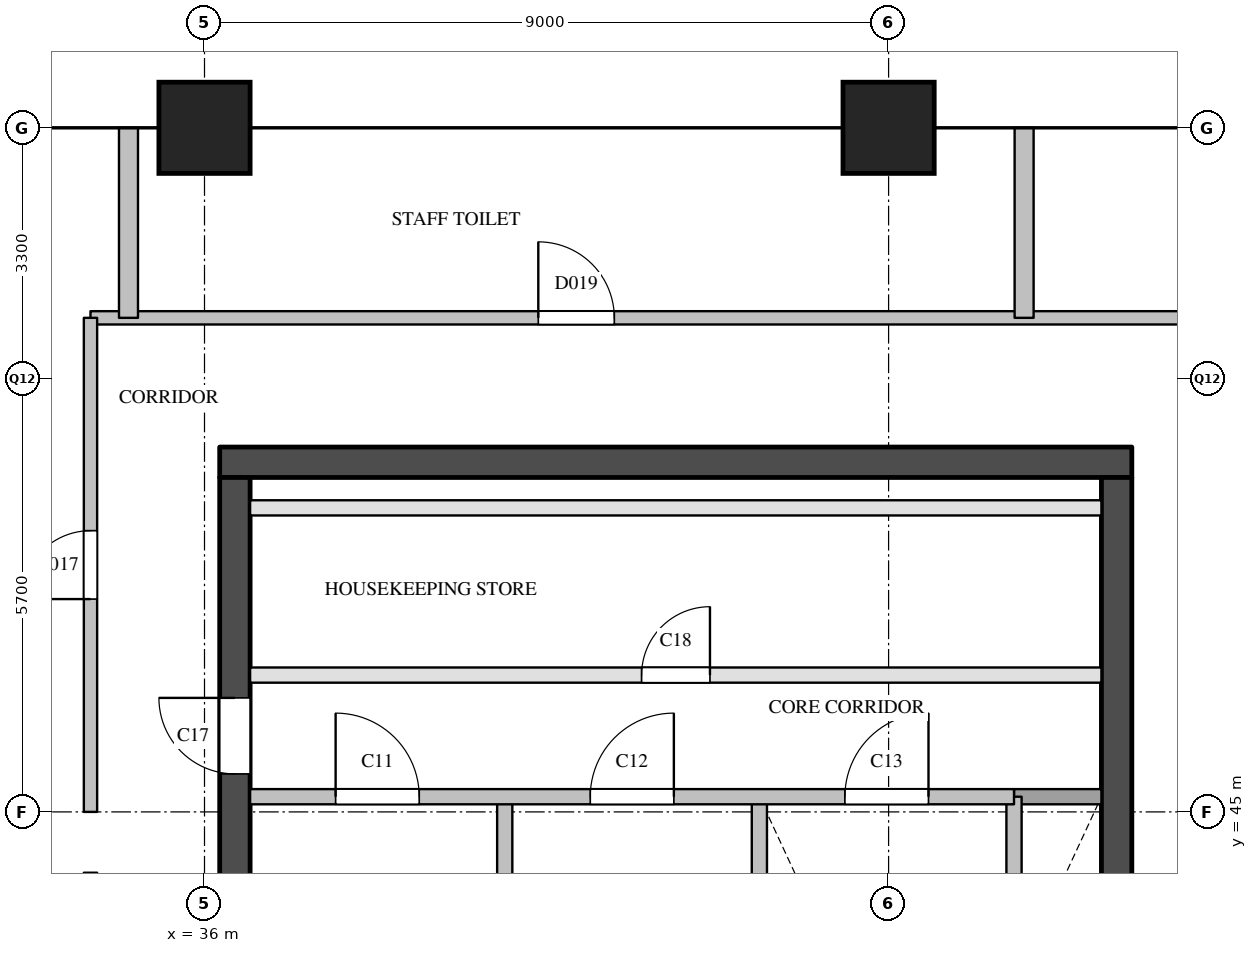
"""IFC4 building model, lengths in metres.
Left out: names, types, materials, properties, quantities, classifications, styles, units other than length and angle.
Written with IfcOpenShell. Run it as: python <this file> out.ifc"""

import sys

from ifc_helpers import new_model, si_unit, direction, frame, frame_2d, origin, origin_2d, place, context, subcontext, project, spatial, rectangle, extrude, element, fill, save


model = new_model("IFC4")
c1 = context("Model", 3, precision=1e-05, world=origin(), true_north=direction((0.0, 1.0)))
c2 = subcontext(c1, "Body", "Model", "MODEL_VIEW")
j1 = project(units=[si_unit("LENGTHUNIT", "METRE"), si_unit("PLANEANGLEUNIT", "RADIAN")], contexts=[c1])
p1 = place(None, origin())
s1 = spatial("IfcSite", under=j1, at=p1, CompositionType="ELEMENT")
p2 = place(p1, origin())
s2 = spatial("IfcBuilding", under=s1, at=p2, CompositionType="ELEMENT")
p3 = place(p2, frame((0.0, 0.0, 250.1)))
s3 = spatial("IfcBuildingStorey", under=s2, at=p3, CompositionType="ELEMENT", Elevation=250.1)
for number, where, z_axis, x_axis in (
    (1, (36.0, 54.0, 0.0), (0.0, 0.0, 1.0), (1.0, 0.0, 0.0)),
    (2, (45.0, 54.0, 0.0), (0.0, 0.0, 1.0), (1.0, 0.0, 0.0)),
):
    element("IfcColumn", number, at=place(p3, frame(where, z_axis=z_axis, x_axis=x_axis)), inside=s3, PredefinedType="COLUMN", context=c2, shape_type="SweptSolid", body=[
        extrude(rectangle(XDim=1.2, YDim=1.2, at=origin_2d()), origin(), (0.0, 0.0, 1.0), 3.9),
    ])
p4 = place(p3, frame((36.2, 49.6, 0.0), z_axis=(0.0, 0.0, 1.0), x_axis=(1.0, 0.0, 0.0)))
e3 = element("IfcWall", 3, at=p4, inside=s3, PredefinedType="SHEAR", context=c2, shape_type="SweptSolid", body=[
    extrude(rectangle(XDim=12.0, YDim=0.4, at=frame_2d((6.0, 0.0))), origin(), (0.0, 0.0, 1.0), 3.6),
])
p5 = place(p3, frame((36.4, 29.1, 0.0), z_axis=(0.0, 0.0, 1.0), x_axis=(0.0, 1.0, 0.0)))
e4 = element("IfcWall", 4, at=p5, inside=s3, PredefinedType="SHEAR", context=c2, shape_type="SweptSolid", body=[
    extrude(rectangle(XDim=20.3, YDim=0.4, at=frame_2d((10.15, 0.0))), origin(), (0.0, 0.0, 1.0), 3.6),
])
p6 = place(p5, frame((3.6, 0.0, 0.0)))
e5 = element("IfcOpeningElement", 5, at=p6, cuts=e4, PredefinedType="OPENING", context=c2, shape_type="SweptSolid", body=[
    extrude(rectangle(XDim=1.8, YDim=2.1, at=frame_2d((0.9, 1.05))), frame((0.0, 0.21, 0.0), z_axis=(0.0, -1.0, 0.0), x_axis=(1.0, 0.0, 0.0)), (0.0, 0.0, 1.0), 0.42),
])
p7 = place(p5, frame((16.4, 0.0, 0.0)))
e6 = element("IfcOpeningElement", 6, at=p7, cuts=e4, PredefinedType="OPENING", context=c2, shape_type="SweptSolid", body=[
    extrude(rectangle(XDim=1.0, YDim=2.1, at=frame_2d((0.5, 1.05))), frame((0.0, 0.21, 0.0), z_axis=(0.0, -1.0, 0.0), x_axis=(1.0, 0.0, 0.0)), (0.0, 0.0, 1.0), 0.42),
])
p8 = place(p3, frame((48.0, 29.1, 0.0), z_axis=(0.0, 0.0, 1.0), x_axis=(0.0, 1.0, 0.0)))
e7 = element("IfcWall", 7, at=p8, inside=s3, PredefinedType="SHEAR", context=c2, shape_type="SweptSolid", body=[
    extrude(rectangle(XDim=20.3, YDim=0.4, at=frame_2d((10.15, 0.0))), origin(), (0.0, 0.0, 1.0), 3.6),
])
p9 = place(p8, frame((12.5, 0.0, 0.0)))
e8 = element("IfcOpeningElement", 8, at=p9, cuts=e7, PredefinedType="OPENING", context=c2, shape_type="SweptSolid", body=[
    extrude(rectangle(XDim=0.7, YDim=2.1, at=frame_2d((0.35, 1.05))), frame((0.0, 0.21, 0.0), z_axis=(0.0, -1.0, 0.0), x_axis=(1.0, 0.0, 0.0)), (0.0, 0.0, 1.0), 0.42),
])
p10 = place(p8, frame((3.9, 0.0, 0.0)))
e9 = element("IfcOpeningElement", 9, at=p10, cuts=e7, PredefinedType="OPENING", context=c2, shape_type="SweptSolid", body=[
    extrude(rectangle(XDim=1.8, YDim=2.1, at=frame_2d((0.9, 1.05))), frame((0.0, 0.21, 0.0), z_axis=(0.0, -1.0, 0.0), x_axis=(1.0, 0.0, 0.0)), (0.0, 0.0, 1.0), 0.42),
])
for number, where, z_axis, x_axis in (
    (10, (39.95, 40.78, 0.0), (0.0, 0.0, 1.0), (0.0, 1.0, 0.0)),
    (11, (43.3, 40.78, 0.0), (0.0, 0.0, 1.0), (0.0, 1.0, 0.0)),
    (12, (46.65, 40.78, 0.0), (0.0, 0.0, 1.0), (0.0, 1.0, 0.0)),
):
    element("IfcWall", number, at=place(p3, frame(where, z_axis=z_axis, x_axis=x_axis)), inside=s3, PredefinedType="SOLIDWALL", context=c2, shape_type="SweptSolid", body=[
        extrude(rectangle(XDim=4.42, YDim=0.2, at=frame_2d((2.21, 0.0))), origin(), (0.0, 0.0, 1.0), 3.6),
    ])
p11 = place(p3, frame((46.65, 45.2, 0.0), z_axis=(0.0, 0.0, 1.0), x_axis=(1.0, 0.0, 0.0)))
e13 = element("IfcWall", 13, at=p11, inside=s3, PredefinedType="SOLIDWALL", context=c2, shape_type="SweptSolid", body=[
    extrude(rectangle(XDim=1.15, YDim=0.2, at=frame_2d((0.575, 0.0))), origin(), (0.0, 0.0, 1.0), 3.6),
])
p12 = place(p3, frame((36.6, 45.2, 0.0), z_axis=(0.0, 0.0, 1.0), x_axis=(1.0, 0.0, 0.0)))
e14 = element("IfcWall", 14, at=p12, inside=s3, PredefinedType="SOLIDWALL", context=c2, shape_type="SweptSolid", body=[
    extrude(rectangle(XDim=10.05, YDim=0.2, at=frame_2d((5.025, 0.0))), origin(), (0.0, 0.0, 1.0), 3.6),
])
p13 = place(p12, frame((1.125, 0.0, 0.0)))
e15 = element("IfcOpeningElement", 15, at=p13, cuts=e14, PredefinedType="OPENING", context=c2, shape_type="SweptSolid", body=[
    extrude(rectangle(XDim=1.1, YDim=2.1, at=frame_2d((0.55, 1.05))), frame((0.0, 0.11, 0.0), z_axis=(0.0, -1.0, 0.0), x_axis=(1.0, 0.0, 0.0)), (0.0, 0.0, 1.0), 0.22),
])
p14 = place(p12, frame((4.475, 0.0, 0.0)))
e16 = element("IfcOpeningElement", 16, at=p14, cuts=e14, PredefinedType="OPENING", context=c2, shape_type="SweptSolid", body=[
    extrude(rectangle(XDim=1.1, YDim=2.1, at=frame_2d((0.55, 1.05))), frame((0.0, 0.11, 0.0), z_axis=(0.0, -1.0, 0.0), x_axis=(1.0, 0.0, 0.0)), (0.0, 0.0, 1.0), 0.22),
])
p15 = place(p12, frame((7.825, 0.0, 0.0)))
e17 = element("IfcOpeningElement", 17, at=p15, cuts=e14, PredefinedType="OPENING", context=c2, shape_type="SweptSolid", body=[
    extrude(rectangle(XDim=1.1, YDim=2.1, at=frame_2d((0.55, 1.05))), frame((0.0, 0.11, 0.0), z_axis=(0.0, -1.0, 0.0), x_axis=(1.0, 0.0, 0.0)), (0.0, 0.0, 1.0), 0.22),
])
p16 = place(p3, frame((36.6, 46.8, 0.0), z_axis=(0.0, 0.0, 1.0), x_axis=(1.0, 0.0, 0.0)))
e18 = element("IfcWall", 18, at=p16, inside=s3, PredefinedType="PARTITIONING", context=c2, shape_type="SweptSolid", body=[
    extrude(rectangle(XDim=11.2, YDim=0.2, at=frame_2d((5.6, 0.0))), origin(), (0.0, 0.0, 1.0), 3.6),
])
p17 = place(p16, frame((5.15, 0.0, 0.0)))
e19 = element("IfcOpeningElement", 19, at=p17, cuts=e18, PredefinedType="OPENING", context=c2, shape_type="SweptSolid", body=[
    extrude(rectangle(XDim=0.9, YDim=2.1, at=frame_2d((0.45, 1.05))), frame((0.0, 0.11, 0.0), z_axis=(0.0, -1.0, 0.0), x_axis=(1.0, 0.0, 0.0)), (0.0, 0.0, 1.0), 0.22),
])
p18 = place(p3, frame((36.6, 49.0, 0.0), z_axis=(0.0, 0.0, 1.0), x_axis=(1.0, 0.0, 0.0)))
e20 = element("IfcWall", 20, at=p18, inside=s3, PredefinedType="PARTITIONING", context=c2, shape_type="SweptSolid", body=[
    extrude(rectangle(XDim=11.2, YDim=0.2, at=frame_2d((5.6, 0.0))), origin(), (0.0, 0.0, 1.0), 3.6),
])
p19 = place(p3, frame((34.5, 51.5, 0.0), z_axis=(0.0, 0.0, 1.0), x_axis=(1.0, 0.0, 0.0)))
e21 = element("IfcWall", 21, at=p19, inside=s3, PredefinedType="PARTITIONING", context=c2, shape_type="SweptSolid", body=[
    extrude(rectangle(XDim=15.4, YDim=0.175, at=frame_2d((7.7, 0.0))), origin(), (0.0, 0.0, 1.0), 3.6),
])
p20 = place(p19, frame((5.892, 0.0, 0.0)))
e22 = element("IfcOpeningElement", 22, at=p20, cuts=e21, PredefinedType="OPENING", context=c2, shape_type="SweptSolid", body=[
    extrude(rectangle(XDim=1.0, YDim=2.1, at=frame_2d((0.5, 1.05))), frame((0.0, 0.097, 0.0), z_axis=(0.0, -1.0, 0.0), x_axis=(1.0, 0.0, 0.0)), (0.0, 0.0, 1.0), 0.195),
])
p21 = place(p3, frame((34.5, 28.5, 0.0), z_axis=(0.0, 0.0, 1.0), x_axis=(0.0, 1.0, 0.0)))
e23 = element("IfcWall", 23, at=p21, inside=s3, PredefinedType="PARTITIONING", context=c2, shape_type="SweptSolid", body=[
    extrude(rectangle(XDim=15.7, YDim=0.175, at=frame_2d((7.85, 0.0))), origin(), (0.0, 0.0, 1.0), 3.6),
])
p22 = place(p21, frame((10.1, 0.0, 0.0)))
e24 = element("IfcOpeningElement", 24, at=p22, cuts=e23, PredefinedType="OPENING", context=c2, shape_type="SweptSolid", body=[
    extrude(rectangle(XDim=1.0, YDim=2.1, at=frame_2d((0.5, 1.05))), frame((0.0, 0.097, 0.0), z_axis=(0.0, -1.0, 0.0), x_axis=(1.0, 0.0, 0.0)), (0.0, 0.0, 1.0), 0.195),
])
p23 = place(p21, frame((11.9, 0.0, 0.0)))
e25 = element("IfcOpeningElement", 25, at=p23, cuts=e23, PredefinedType="OPENING", context=c2, shape_type="SweptSolid", body=[
    extrude(rectangle(XDim=1.0, YDim=2.1, at=frame_2d((0.5, 1.05))), frame((0.0, 0.097, 0.0), z_axis=(0.0, -1.0, 0.0), x_axis=(1.0, 0.0, 0.0)), (0.0, 0.0, 1.0), 0.195),
])
p24 = place(p3, frame((34.5, 45.0, 0.0), z_axis=(0.0, 0.0, 1.0), x_axis=(0.0, 1.0, 0.0)))
e26 = element("IfcWall", 26, at=p24, inside=s3, PredefinedType="PARTITIONING", context=c2, shape_type="SweptSolid", body=[
    extrude(rectangle(XDim=6.5, YDim=0.175, at=frame_2d((3.25, 0.0))), origin(), (0.0, 0.0, 1.0), 3.6),
])
p25 = place(p24, frame((2.8, 0.0, 0.0)))
e27 = element("IfcOpeningElement", 27, at=p25, cuts=e26, PredefinedType="OPENING", context=c2, shape_type="SweptSolid", body=[
    extrude(rectangle(XDim=0.9, YDim=2.1, at=frame_2d((0.45, 1.05))), frame((0.0, 0.097, 0.0), z_axis=(0.0, -1.0, 0.0), x_axis=(1.0, 0.0, 0.0)), (0.0, 0.0, 1.0), 0.195),
])
for number, where, z_axis, x_axis in (
    (28, (35.0, 51.5, 0.0), (0.0, 0.0, 1.0), (0.0, 1.0, 0.0)),
    (29, (46.783, 51.5, 0.0), (0.0, 0.0, 1.0), (0.0, 1.0, 0.0)),
):
    element("IfcWall", number, at=place(p3, frame(where, z_axis=z_axis, x_axis=x_axis)), inside=s3, PredefinedType="PARTITIONING", context=c2, shape_type="SweptSolid", body=[
        extrude(rectangle(XDim=2.5, YDim=0.25, at=frame_2d((1.25, 0.0))), origin(), (0.0, 0.0, 1.0), 2.6),
    ])
p26 = place(p13, origin())
e30 = element("IfcDoor", 30, at=p26, inside=s3, OperationType="SINGLE_SWING_LEFT", PredefinedType="DOOR", context=c2, shape_type="SweptSolid", body=[
    extrude(rectangle(XDim=1.1, YDim=2.1, at=frame_2d((0.55, 1.05))), frame((0.0, 0.025, 0.0), z_axis=(0.0, -1.0, 0.0), x_axis=(1.0, 0.0, 0.0)), (0.0, 0.0, 1.0), 0.05),
])
fill(e15, e30)
p27 = place(p14, origin())
e31 = element("IfcDoor", 31, at=p27, inside=s3, OperationType="SINGLE_SWING_RIGHT", PredefinedType="DOOR", context=c2, shape_type="SweptSolid", body=[
    extrude(rectangle(XDim=1.1, YDim=2.1, at=frame_2d((0.55, 1.05))), frame((0.0, 0.025, 0.0), z_axis=(0.0, -1.0, 0.0), x_axis=(1.0, 0.0, 0.0)), (0.0, 0.0, 1.0), 0.05),
])
fill(e16, e31)
p28 = place(p15, origin())
e32 = element("IfcDoor", 32, at=p28, inside=s3, OperationType="SINGLE_SWING_RIGHT", PredefinedType="DOOR", context=c2, shape_type="SweptSolid", body=[
    extrude(rectangle(XDim=1.1, YDim=2.1, at=frame_2d((0.55, 1.05))), frame((0.0, 0.025, 0.0), z_axis=(0.0, -1.0, 0.0), x_axis=(1.0, 0.0, 0.0)), (0.0, 0.0, 1.0), 0.05),
])
fill(e17, e32)
p29 = place(p7, origin())
e33 = element("IfcDoor", 33, at=p29, inside=s3, OperationType="SINGLE_SWING_RIGHT", PredefinedType="DOOR", context=c2, shape_type="SweptSolid", body=[
    extrude(rectangle(XDim=1.0, YDim=2.1, at=frame_2d((0.5, 1.05))), frame((0.0, 0.025, 0.0), z_axis=(0.0, -1.0, 0.0), x_axis=(1.0, 0.0, 0.0)), (0.0, 0.0, 1.0), 0.05),
])
fill(e6, e33)
p30 = place(p17, origin())
e34 = element("IfcDoor", 34, at=p30, inside=s3, OperationType="SINGLE_SWING_RIGHT", PredefinedType="DOOR", context=c2, shape_type="SweptSolid", body=[
    extrude(rectangle(XDim=0.9, YDim=2.1, at=frame_2d((0.45, 1.05))), frame((0.0, 0.025, 0.0), z_axis=(0.0, -1.0, 0.0), x_axis=(1.0, 0.0, 0.0)), (0.0, 0.0, 1.0), 0.05),
])
fill(e19, e34)
p31 = place(p25, origin())
e35 = element("IfcDoor", 35, at=p31, inside=s3, OperationType="SINGLE_SWING_LEFT", PredefinedType="DOOR", context=c2, shape_type="SweptSolid", body=[
    extrude(rectangle(XDim=0.9, YDim=2.1, at=frame_2d((0.45, 1.05))), frame((0.0, 0.025, 0.0), z_axis=(0.0, -1.0, 0.0), x_axis=(1.0, 0.0, 0.0)), (0.0, 0.0, 1.0), 0.05),
])
fill(e27, e35)
p32 = place(p20, origin())
e36 = element("IfcDoor", 36, at=p32, inside=s3, OperationType="SINGLE_SWING_LEFT", PredefinedType="DOOR", context=c2, shape_type="SweptSolid", body=[
    extrude(rectangle(XDim=1.0, YDim=2.1, at=frame_2d((0.5, 1.05))), frame((0.0, 0.025, 0.0), z_axis=(0.0, -1.0, 0.0), x_axis=(1.0, 0.0, 0.0)), (0.0, 0.0, 1.0), 0.05),
])
fill(e22, e36)
save(model, sys.argv[1])
